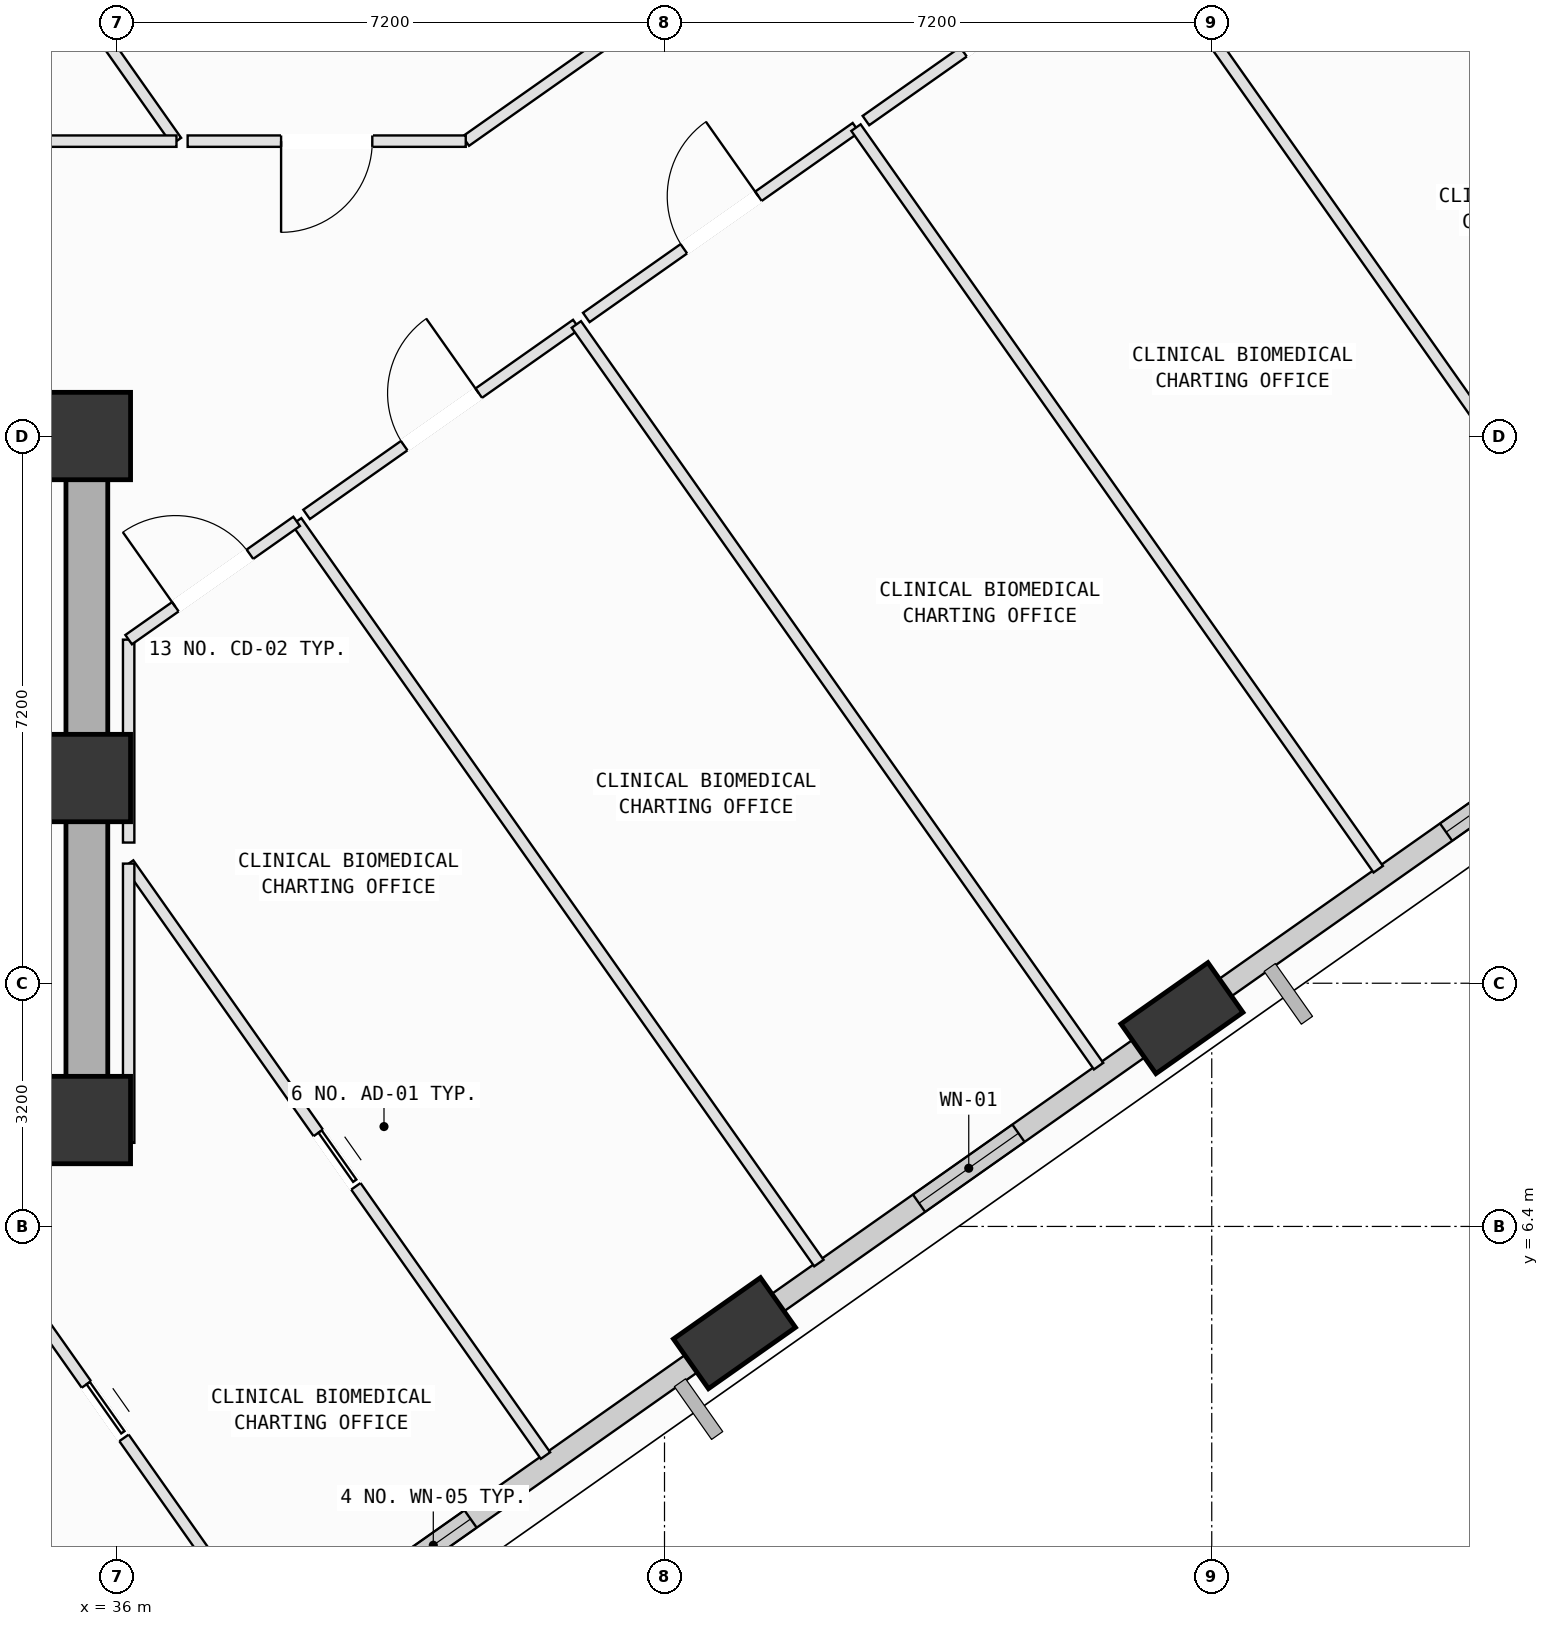
"""IFC4 building model, lengths in metres.
Left out: names, types, materials, properties, quantities, classifications, styles, units other than length and angle.
Written with IfcOpenShell. Run it as: python <this file> out.ifc"""

import sys

from ifc_helpers import new_model, si_unit, direction, frame, frame_2d, origin, origin_2d, place, context, subcontext, project, spatial, rectangle, extrude, element, fill, save


model = new_model("IFC4")
c1 = context("Model", 3, precision=1e-05, world=origin(), true_north=direction((0.0, 1.0)))
c2 = subcontext(c1, "Body", "Model", "MODEL_VIEW")
j1 = project(units=[si_unit("LENGTHUNIT", "METRE"), si_unit("PLANEANGLEUNIT", "RADIAN")], contexts=[c1])
p1 = place(None, origin())
s1 = spatial("IfcSite", under=j1, at=p1, CompositionType="ELEMENT")
p2 = place(p1, origin())
s2 = spatial("IfcBuilding", under=s1, at=p2, CompositionType="ELEMENT")
p3 = place(p2, frame((0.0, 0.0, 173.8)))
s3 = spatial("IfcBuildingStorey", under=s2, at=p3, CompositionType="ELEMENT", Elevation=173.8)
for number, where, z_axis, x_axis in (
    (1, (35.6, 7.8, 0.0), (0.0, 0.0, 1.0), (1.0, 0.0, 0.0)),
    (2, (35.6, 12.3, 0.0), (0.0, 0.0, 1.0), (1.0, 0.0, 0.0)),
    (3, (35.6, 16.8, 0.0), (0.0, 0.0, 1.0), (1.0, 0.0, 0.0)),
):
    element("IfcColumn", number, at=place(p3, frame(where, z_axis=z_axis, x_axis=x_axis)), inside=s3, PredefinedType="COLUMN", context=c2, shape_type="SweptSolid", body=[
        extrude(rectangle(XDim=1.15, YDim=1.15, at=origin_2d()), origin(), (0.0, 0.0, 1.0), 4.0),
    ])
p4 = place(p3, frame((44.12, 4.995, 0.002), z_axis=(0.081388904542, 0.044100863821, 0.99570626192), x_axis=(-0.893547683175, 0.445794021134, 0.053293795269)))
e4 = element("IfcColumn", 4, at=p4, inside=s3, PredefinedType="COLUMN", context=c2, shape_type="SweptSolid", body=[
    extrude(rectangle(XDim=1.4, YDim=0.8, at=origin_2d()), origin(), (0.0, 0.0, 1.0), 4.014),
])
p5 = place(p3, frame((50.008, 9.141, 0.002), z_axis=(0.064046562538, 0.068243345838, 0.99561080929), x_axis=(-0.988458606435, 0.14158514562, 0.053881628639)))
e5 = element("IfcColumn", 5, at=p5, inside=s3, PredefinedType="COLUMN", context=c2, shape_type="SweptSolid", body=[
    extrude(rectangle(XDim=1.4, YDim=0.8, at=origin_2d()), origin(), (0.0, 0.0, 1.0), 4.014),
])
p6 = place(p3, frame((43.866, 4.816, 0.0), z_axis=(0.0, 0.0, 1.0), x_axis=(-0.81764887873, -0.575717214535, 0.0)))
e6 = element("IfcWall", 6, at=p6, inside=s3, PredefinedType="SOLIDWALL", context=c2, shape_type="SweptSolid", body=[
    extrude(rectangle(XDim=6.214, YDim=0.28, at=frame_2d((3.107, 0.0))), origin(), (0.0, 0.0, 1.0), 3.265),
])
p7 = place(p6, frame((3.935, 0.0, 0.75)))
e7 = element("IfcOpeningElement", 7, at=p7, cuts=e6, PredefinedType="OPENING", context=c2, shape_type="SweptSolid", body=[
    extrude(rectangle(XDim=1.2, YDim=1.75, at=frame_2d((0.6, 0.875))), frame((0.0, 0.15, 0.0), z_axis=(0.0, -1.0, 0.0), x_axis=(1.0, 0.0, 0.0)), (0.0, 0.0, 1.0), 0.3),
])
p8 = place(p3, frame((49.753, 8.962, 0.0), z_axis=(0.0, 0.0, 1.0), x_axis=(-0.817636402399, -0.575734933343, 0.0)))
e8 = element("IfcWall", 8, at=p8, inside=s3, PredefinedType="SOLIDWALL", context=c2, shape_type="SweptSolid", body=[
    extrude(rectangle(XDim=6.209, YDim=0.28, at=frame_2d((3.104, 0.0))), origin(), (0.0, 0.0, 1.0), 3.265),
])
p9 = place(p8, frame((2.319, 0.0, 0.75)))
e9 = element("IfcOpeningElement", 9, at=p9, cuts=e8, PredefinedType="OPENING", context=c2, shape_type="SweptSolid", body=[
    extrude(rectangle(XDim=1.6, YDim=1.95, at=frame_2d((0.8, 0.975))), frame((0.0, 0.15, 0.0), z_axis=(0.0, -1.0, 0.0), x_axis=(1.0, 0.0, 0.0)), (0.0, 0.0, 1.0), 0.3),
])
p10 = place(p3, frame((55.647, 13.111, 0.0), z_axis=(0.0, 0.0, 1.0), x_axis=(-0.817651715205, -0.575713186077, 0.0)))
e10 = element("IfcWall", 10, at=p10, inside=s3, PredefinedType="SOLIDWALL", context=c2, shape_type="SweptSolid", body=[
    extrude(rectangle(XDim=6.218, YDim=0.28, at=frame_2d((3.109, 0.0))), origin(), (0.0, 0.0, 1.0), 3.265),
])
p11 = place(p10, frame((0.646, 0.0, 0.75)))
e11 = element("IfcOpeningElement", 11, at=p11, cuts=e10, PredefinedType="OPENING", context=c2, shape_type="SweptSolid", body=[
    extrude(rectangle(XDim=2.0, YDim=1.95, at=frame_2d((1.0, 0.975))), frame((0.0, 0.15, 0.0), z_axis=(0.0, -1.0, 0.0), x_axis=(1.0, 0.0, 0.0)), (0.0, 0.0, 1.0), 0.3),
])
p12 = place(p3, frame((24.8, 7.8, 0.0), z_axis=(0.0, 0.0, 1.0), x_axis=(1.0, 0.0, 0.0)))
e12 = element("IfcWall", 12, at=p12, inside=s3, PredefinedType="SHEAR", context=c2, shape_type="SweptSolid", body=[
    extrude(rectangle(XDim=10.8, YDim=0.55, at=frame_2d((5.4, 0.0))), origin(), (0.0, 0.0, 1.0), 3.78),
])
p13 = place(p3, frame((35.6, 7.8, 0.0), z_axis=(0.0, 0.0, 1.0), x_axis=(0.0, 1.0, 0.0)))
e13 = element("IfcWall", 13, at=p13, inside=s3, PredefinedType="SHEAR", context=c2, shape_type="SweptSolid", body=[
    extrude(rectangle(XDim=9.0, YDim=0.55, at=frame_2d((4.5, 0.0))), origin(), (0.0, 0.0, 1.0), 3.78),
])
p14 = place(p3, frame((33.236, 7.669, 0.0), z_axis=(0.0, 0.0, 1.0), x_axis=(0.575764322931, -0.817615707065, 0.0)))
e14 = element("IfcWall", 14, at=p14, inside=s3, PredefinedType="PARTITIONING", context=c2, shape_type="SweptSolid", body=[
    extrude(rectangle(XDim=8.682, YDim=0.15, at=frame_2d((4.341, 0.0))), origin(), (0.0, 0.0, 1.0), 3.78),
])
p15 = place(p14, frame((4.095, 0.0, 0.0)))
e15 = element("IfcOpeningElement", 15, at=p15, cuts=e14, PredefinedType="OPENING", context=c2, shape_type="SweptSolid", body=[
    extrude(rectangle(XDim=0.86, YDim=2.06, at=frame_2d((0.43, 1.03))), frame((0.0, 0.085, 0.0), z_axis=(0.0, -1.0, 0.0), x_axis=(1.0, 0.0, 0.0)), (0.0, 0.0, 1.0), 0.17),
])
p16 = place(p3, frame((36.15, 11.174, 0.0), z_axis=(0.0, 0.0, 1.0), x_axis=(0.575699711448, -0.817661202601, 0.0)))
e16 = element("IfcWall", 16, at=p16, inside=s3, PredefinedType="PARTITIONING", context=c2, shape_type="SweptSolid", body=[
    extrude(rectangle(XDim=9.526, YDim=0.15, at=frame_2d((4.763, 0.0))), origin(), (0.0, 0.0, 1.0), 3.78),
])
p17 = place(p16, frame((4.333, 0.0, 0.0)))
e17 = element("IfcOpeningElement", 17, at=p17, cuts=e16, PredefinedType="OPENING", context=c2, shape_type="SweptSolid", body=[
    extrude(rectangle(XDim=0.86, YDim=2.06, at=frame_2d((0.43, 1.03))), frame((0.0, 0.085, 0.0), z_axis=(0.0, -1.0, 0.0), x_axis=(1.0, 0.0, 0.0)), (0.0, 0.0, 1.0), 0.17),
])
p18 = place(p3, frame((35.6, 7.5, 0.0), z_axis=(0.0, 0.0, 1.0), x_axis=(1.0, 0.0, 0.0)))
e18 = element("IfcWall", 18, at=p18, inside=s3, PredefinedType="PARTITIONING", context=c2, shape_type="SweptSolid", body=[
    extrude(rectangle(XDim=0.55, YDim=0.15, at=frame_2d((0.275, 0.0))), origin(), (0.0, 0.0, 1.0), 3.065),
])
p19 = place(p3, frame((36.15, 7.5, 0.0), z_axis=(0.0, 0.0, 1.0), x_axis=(0.0, 1.0, 0.0)))
e19 = element("IfcWall", 19, at=p19, inside=s3, PredefinedType="PARTITIONING", context=c2, shape_type="SweptSolid", body=[
    extrude(rectangle(XDim=3.674, YDim=0.15, at=frame_2d((1.837, 0.0))), origin(), (0.0, 0.0, 1.0), 3.78),
])
p20 = place(p3, frame((38.36, 15.677, 0.0), z_axis=(0.0, 0.0, 1.0), x_axis=(0.575682896217, -0.817673041627, 0.0)))
e20 = element("IfcWall", 20, at=p20, inside=s3, PredefinedType="PARTITIONING", context=c2, shape_type="SweptSolid", body=[
    extrude(rectangle(XDim=11.935, YDim=0.15, at=frame_2d((5.968, 0.0))), origin(), (0.0, 0.0, 1.0), 3.78),
])
p21 = place(p3, frame((44.809, 5.199, 0.0), z_axis=(0.0, 0.0, 1.0), x_axis=(-0.817656227309, -0.575706777747, 0.0)))
e21 = element("IfcWall", 21, at=p21, inside=s3, PredefinedType="PARTITIONING", context=c2, shape_type="SweptSolid", body=[
    extrude(rectangle(XDim=0.992, YDim=0.15, at=frame_2d((0.496, 0.0))), origin(), (0.0, 0.0, 1.0), 3.265),
])
p22 = place(p3, frame((36.15, 11.451, 0.0), z_axis=(0.0, 0.0, 1.0), x_axis=(0.0, 1.0, 0.0)))
e22 = element("IfcWall", 22, at=p22, inside=s3, PredefinedType="PARTITIONING", context=c2, shape_type="SweptSolid", body=[
    extrude(rectangle(XDim=2.67, YDim=0.15, at=frame_2d((1.335, 0.0))), origin(), (0.0, 0.0, 1.0), 3.78),
])
p23 = place(p3, frame((36.15, 14.121, 0.0), z_axis=(0.0, 0.0, 1.0), x_axis=(0.817705641337, 0.575636590328, 0.0)))
e23 = element("IfcWall", 23, at=p23, inside=s3, PredefinedType="PARTITIONING", context=c2, shape_type="SweptSolid", body=[
    extrude(rectangle(XDim=2.703, YDim=0.15, at=frame_2d((1.352, 0.0))), origin(), (0.0, 0.0, 1.0), 3.78),
])
p24 = place(p23, frame((0.751, 0.0, 0.0)))
e24 = element("IfcOpeningElement", 24, at=p24, cuts=e23, PredefinedType="OPENING", context=c2, shape_type="SweptSolid", body=[
    extrude(rectangle(XDim=1.2, YDim=2.15, at=frame_2d((0.6, 1.075))), frame((0.0, 0.085, 0.0), z_axis=(0.0, -1.0, 0.0), x_axis=(1.0, 0.0, 0.0)), (0.0, 0.0, 1.0), 0.17),
])
p25 = place(p3, frame((38.491, 15.769, 0.0), z_axis=(0.0, 0.0, 1.0), x_axis=(0.817640693415, 0.575728839361, 0.0)))
e25 = element("IfcWall", 25, at=p25, inside=s3, PredefinedType="PARTITIONING", context=c2, shape_type="SweptSolid", body=[
    extrude(rectangle(XDim=4.341, YDim=0.15, at=frame_2d((2.17, 0.0))), origin(), (0.0, 0.0, 1.0), 3.78),
])
p26 = place(p25, frame((1.57, 0.0, 0.0)))
e26 = element("IfcOpeningElement", 26, at=p26, cuts=e25, PredefinedType="OPENING", context=c2, shape_type="SweptSolid", body=[
    extrude(rectangle(XDim=1.2, YDim=2.15, at=frame_2d((0.6, 1.075))), frame((0.0, 0.085, 0.0), z_axis=(0.0, -1.0, 0.0), x_axis=(1.0, 0.0, 0.0)), (0.0, 0.0, 1.0), 0.17),
])
p27 = place(p3, frame((42.04, 18.268, 0.0), z_axis=(0.0, 0.0, 1.0), x_axis=(0.575682896217, -0.817673041627, 0.0)))
e27 = element("IfcWall", 27, at=p27, inside=s3, PredefinedType="PARTITIONING", context=c2, shape_type="SweptSolid", body=[
    extrude(rectangle(XDim=11.935, YDim=0.15, at=frame_2d((5.968, 0.0))), origin(), (0.0, 0.0, 1.0), 3.78),
])
p28 = place(p3, frame((42.171, 18.36, 0.0), z_axis=(0.0, 0.0, 1.0), x_axis=(0.81769852076, 0.575646705147, 0.0)))
e28 = element("IfcWall", 28, at=p28, inside=s3, PredefinedType="PARTITIONING", context=c2, shape_type="SweptSolid", body=[
    extrude(rectangle(XDim=4.339, YDim=0.15, at=frame_2d((2.169, 0.0))), origin(), (0.0, 0.0, 1.0), 3.78),
])
p29 = place(p28, frame((1.57, 0.0, 0.0)))
e29 = element("IfcOpeningElement", 29, at=p29, cuts=e28, PredefinedType="OPENING", context=c2, shape_type="SweptSolid", body=[
    extrude(rectangle(XDim=1.2, YDim=2.15, at=frame_2d((0.6, 1.075))), frame((0.0, 0.085, 0.0), z_axis=(0.0, -1.0, 0.0), x_axis=(1.0, 0.0, 0.0)), (0.0, 0.0, 1.0), 0.17),
])
p30 = place(p3, frame((45.719, 20.858, 0.0), z_axis=(0.0, 0.0, 1.0), x_axis=(0.575744719848, -0.817629511189, 0.0)))
e30 = element("IfcWall", 30, at=p30, inside=s3, PredefinedType="PARTITIONING", context=c2, shape_type="SweptSolid", body=[
    extrude(rectangle(XDim=11.934, YDim=0.15, at=frame_2d((5.967, 0.0))), origin(), (0.0, 0.0, 1.0), 3.78),
])
p31 = place(p3, frame((50.695, 9.343, 0.0), z_axis=(0.0, 0.0, 1.0), x_axis=(-0.8179311641, -0.575316096415, 0.0)))
e31 = element("IfcWall", 31, at=p31, inside=s3, PredefinedType="PARTITIONING", context=c2, shape_type="SweptSolid", body=[
    extrude(rectangle(XDim=0.989, YDim=0.15, at=frame_2d((0.495, 0.0))), origin(), (0.0, 0.0, 1.0), 3.265),
])
p32 = place(p3, frame((45.85, 20.951, 0.0), z_axis=(0.0, 0.0, 1.0), x_axis=(0.817727963856, 0.575604879346, 0.0)))
e32 = element("IfcWall", 32, at=p32, inside=s3, PredefinedType="PARTITIONING", context=c2, shape_type="SweptSolid", body=[
    extrude(rectangle(XDim=4.34, YDim=0.15, at=frame_2d((2.17, 0.0))), origin(), (0.0, 0.0, 1.0), 3.78),
])
p33 = place(p32, frame((1.57, 0.0, 0.0)))
e33 = element("IfcOpeningElement", 33, at=p33, cuts=e32, PredefinedType="OPENING", context=c2, shape_type="SweptSolid", body=[
    extrude(rectangle(XDim=1.2, YDim=2.15, at=frame_2d((0.6, 1.075))), frame((0.0, 0.085, 0.0), z_axis=(0.0, -1.0, 0.0), x_axis=(1.0, 0.0, 0.0)), (0.0, 0.0, 1.0), 0.17),
])
p34 = place(p3, frame((49.399, 23.449, 0.0), z_axis=(0.0, 0.0, 1.0), x_axis=(0.575704672979, -0.817657709259, 0.0)))
e34 = element("IfcWall", 34, at=p34, inside=s3, PredefinedType="PARTITIONING", context=c2, shape_type="SweptSolid", body=[
    extrude(rectangle(XDim=12.279, YDim=0.15, at=frame_2d((6.14, 0.0))), origin(), (0.0, 0.0, 1.0), 3.78),
])
p35 = place(p3, frame((53.078, 26.04, 0.0), z_axis=(0.0, 0.0, 1.0), x_axis=(0.575696572392, -0.817663412742, 0.0)))
e35 = element("IfcWall", 35, at=p35, inside=s3, PredefinedType="PARTITIONING", context=c2, shape_type="SweptSolid", body=[
    extrude(rectangle(XDim=11.935, YDim=0.15, at=frame_2d((5.968, 0.0))), origin(), (0.0, 0.0, 1.0), 3.78),
])
p36 = place(p3, frame((34.247, 24.277, 0.0), z_axis=(0.0, 0.0, 1.0), x_axis=(0.575591010878, -0.8177377258, 0.0)))
e36 = element("IfcWall", 36, at=p36, inside=s3, PredefinedType="PARTITIONING", context=c2, shape_type="SweptSolid", body=[
    extrude(rectangle(XDim=4.399, YDim=0.15, at=frame_2d((2.199, 0.0))), origin(), (0.0, 0.0, 1.0), 3.78),
])
p37 = place(p3, frame((36.779, 20.68, 0.0), z_axis=(0.0, 0.0, 1.0), x_axis=(-1.0, 0.0, 0.0)))
e37 = element("IfcWall", 37, at=p37, inside=s3, PredefinedType="PARTITIONING", context=c2, shape_type="SweptSolid", body=[
    extrude(rectangle(XDim=5.582, YDim=0.15, at=frame_2d((2.791, 0.0))), origin(), (0.0, 0.0, 1.0), 3.415),
])
p38 = place(p37, frame((2.291, 0.0, 0.0)))
e38 = element("IfcOpeningElement", 38, at=p38, cuts=e37, PredefinedType="OPENING", context=c2, shape_type="SweptSolid", body=[
    extrude(rectangle(XDim=1.0, YDim=2.12, at=frame_2d((0.5, 1.06))), frame((0.0, 0.085, 0.0), z_axis=(0.0, -1.0, 0.0), x_axis=(1.0, 0.0, 0.0)), (0.0, 0.0, 1.0), 0.17),
])
p39 = place(p3, frame((42.732, 22.192, 0.0), z_axis=(0.0, 0.0, 1.0), x_axis=(-0.81760379004, -0.575781245363, 0.0)))
e39 = element("IfcWall", 39, at=p39, inside=s3, PredefinedType="PARTITIONING", context=c2, shape_type="SweptSolid", body=[
    extrude(rectangle(XDim=2.626, YDim=0.15, at=frame_2d((1.313, 0.0))), origin(), (0.0, 0.0, 1.0), 3.78),
])
p40 = place(p3, frame((40.585, 20.68, 0.0), z_axis=(0.0, 0.0, 1.0), x_axis=(-1.0, 0.0, 0.0)))
e40 = element("IfcWall", 40, at=p40, inside=s3, PredefinedType="PARTITIONING", context=c2, shape_type="SweptSolid", body=[
    extrude(rectangle(XDim=3.659, YDim=0.15, at=frame_2d((1.83, 0.0))), origin(), (0.0, 0.0, 1.0), 3.78),
])
p41 = place(p40, frame((1.229, 0.0, 0.0)))
e41 = element("IfcOpeningElement", 41, at=p41, cuts=e40, PredefinedType="OPENING", context=c2, shape_type="SweptSolid", body=[
    extrude(rectangle(XDim=1.2, YDim=2.15, at=frame_2d((0.6, 1.075))), frame((0.0, 0.085, 0.0), z_axis=(0.0, -1.0, 0.0), x_axis=(1.0, 0.0, 0.0)), (0.0, 0.0, 1.0), 0.17),
])
p42 = place(p7, origin())
e42 = element("IfcWindow", 42, at=p42, inside=s3, PartitioningType="SINGLE_PANEL", PredefinedType="WINDOW", context=c2, shape_type="SweptSolid", body=[
    extrude(rectangle(XDim=1.2, YDim=1.75, at=frame_2d((0.6, 0.875))), frame((0.0, 0.03, 0.0), z_axis=(0.0, -1.0, 0.0), x_axis=(1.0, 0.0, 0.0)), (0.0, 0.0, 1.0), 0.06),
])
fill(e7, e42)
p43 = place(p9, origin())
e43 = element("IfcWindow", 43, at=p43, inside=s3, PartitioningType="SINGLE_PANEL", PredefinedType="WINDOW", context=c2, shape_type="SweptSolid", body=[
    extrude(rectangle(XDim=1.6, YDim=1.95, at=frame_2d((0.8, 0.975))), frame((0.0, 0.03, 0.0), z_axis=(0.0, -1.0, 0.0), x_axis=(1.0, 0.0, 0.0)), (0.0, 0.0, 1.0), 0.06),
])
fill(e9, e43)
p44 = place(p11, origin())
e44 = element("IfcWindow", 44, at=p44, inside=s3, PartitioningType="SINGLE_PANEL", PredefinedType="WINDOW", context=c2, shape_type="SweptSolid", body=[
    extrude(rectangle(XDim=2.0, YDim=1.95, at=frame_2d((1.0, 0.975))), frame((0.0, 0.03, 0.0), z_axis=(0.0, -1.0, 0.0), x_axis=(1.0, 0.0, 0.0)), (0.0, 0.0, 1.0), 0.06),
])
fill(e11, e44)
p45 = place(p24, origin())
e45 = element("IfcDoor", 45, at=p45, inside=s3, OperationType="SINGLE_SWING_LEFT", PredefinedType="DOOR", context=c2, shape_type="SweptSolid", body=[
    extrude(rectangle(XDim=1.2, YDim=2.15, at=frame_2d((0.6, 1.075))), frame((0.0, 0.025, 0.0), z_axis=(0.0, -1.0, 0.0), x_axis=(1.0, 0.0, 0.0)), (0.0, 0.0, 1.0), 0.05),
])
fill(e24, e45)
p46 = place(p26, origin())
e46 = element("IfcDoor", 46, at=p46, inside=s3, OperationType="SINGLE_SWING_RIGHT", PredefinedType="DOOR", context=c2, shape_type="SweptSolid", body=[
    extrude(rectangle(XDim=1.2, YDim=2.15, at=frame_2d((0.6, 1.075))), frame((0.0, 0.025, 0.0), z_axis=(0.0, -1.0, 0.0), x_axis=(1.0, 0.0, 0.0)), (0.0, 0.0, 1.0), 0.05),
])
fill(e26, e46)
p47 = place(p29, origin())
e47 = element("IfcDoor", 47, at=p47, inside=s3, OperationType="SINGLE_SWING_RIGHT", PredefinedType="DOOR", context=c2, shape_type="SweptSolid", body=[
    extrude(rectangle(XDim=1.2, YDim=2.15, at=frame_2d((0.6, 1.075))), frame((0.0, 0.025, 0.0), z_axis=(0.0, -1.0, 0.0), x_axis=(1.0, 0.0, 0.0)), (0.0, 0.0, 1.0), 0.05),
])
fill(e29, e47)
p48 = place(p33, origin())
e48 = element("IfcDoor", 48, at=p48, inside=s3, OperationType="SINGLE_SWING_LEFT", PredefinedType="DOOR", context=c2, shape_type="SweptSolid", body=[
    extrude(rectangle(XDim=1.2, YDim=2.15, at=frame_2d((0.6, 1.075))), frame((0.0, 0.025, 0.0), z_axis=(0.0, -1.0, 0.0), x_axis=(1.0, 0.0, 0.0)), (0.0, 0.0, 1.0), 0.05),
])
fill(e33, e48)
p49 = place(p41, origin())
e49 = element("IfcDoor", 49, at=p49, inside=s3, OperationType="SINGLE_SWING_RIGHT", PredefinedType="DOOR", context=c2, shape_type="SweptSolid", body=[
    extrude(rectangle(XDim=1.2, YDim=2.15, at=frame_2d((0.6, 1.075))), frame((0.0, 0.025, 0.0), z_axis=(0.0, -1.0, 0.0), x_axis=(1.0, 0.0, 0.0)), (0.0, 0.0, 1.0), 0.05),
])
fill(e41, e49)
p50 = place(p17, origin())
e50 = element("IfcDoor", 50, at=p50, inside=s3, OperationType="SLIDING_TO_LEFT", PredefinedType="DOOR", context=c2, shape_type="SweptSolid", body=[
    extrude(rectangle(XDim=0.86, YDim=2.06, at=frame_2d((0.43, 1.03))), frame((0.0, 0.025, 0.0), z_axis=(0.0, -1.0, 0.0), x_axis=(1.0, 0.0, 0.0)), (0.0, 0.0, 1.0), 0.05),
])
fill(e17, e50)
p51 = place(p15, origin())
e51 = element("IfcDoor", 51, at=p51, inside=s3, OperationType="SLIDING_TO_LEFT", PredefinedType="DOOR", context=c2, shape_type="SweptSolid", body=[
    extrude(rectangle(XDim=0.86, YDim=2.06, at=frame_2d((0.43, 1.03))), frame((0.0, 0.025, 0.0), z_axis=(0.0, -1.0, 0.0), x_axis=(1.0, 0.0, 0.0)), (0.0, 0.0, 1.0), 0.05),
])
fill(e15, e51)
save(model, sys.argv[1])
